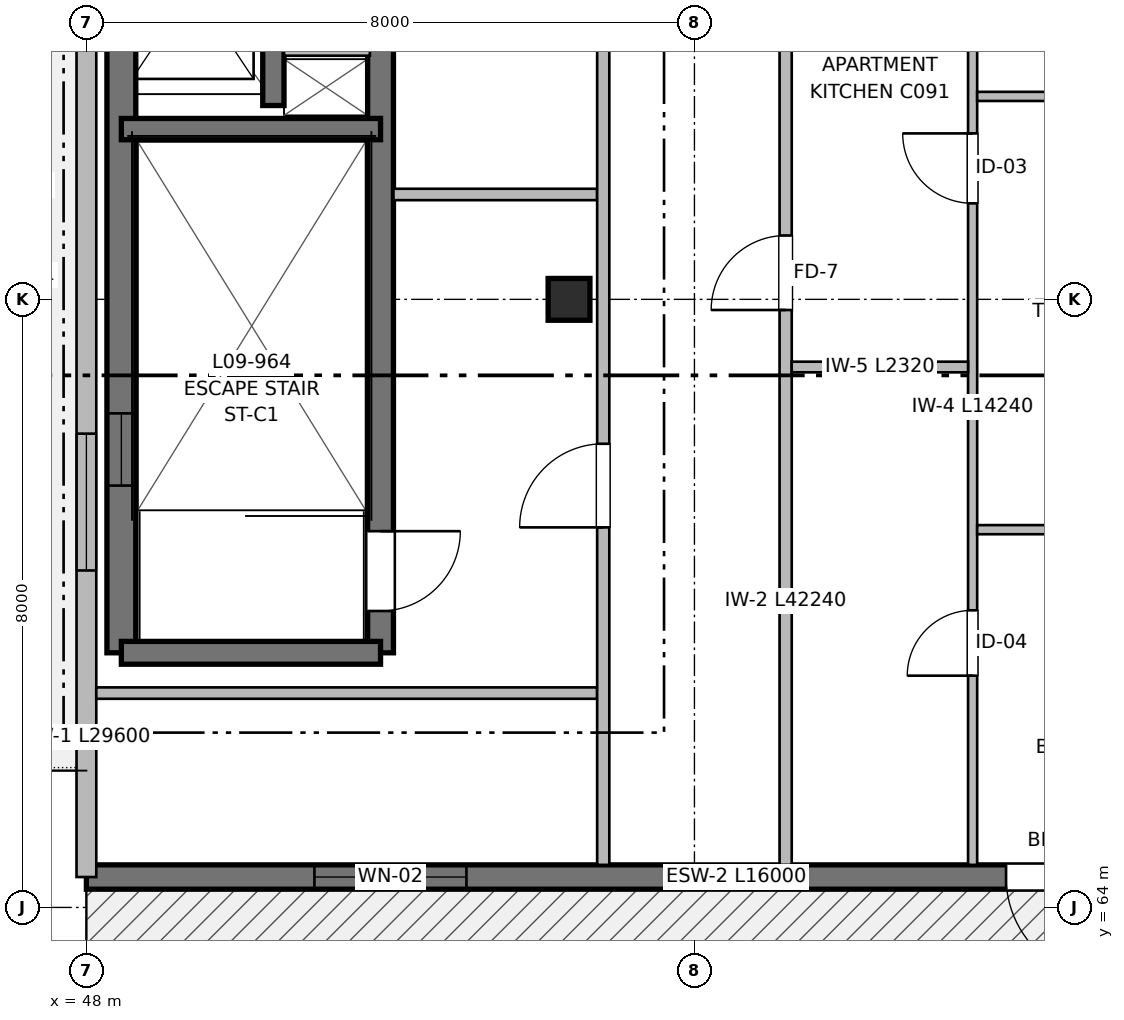
"""IFC4 building model, lengths in metres.
Left out: names, types, materials, properties, quantities, classifications, styles, units other than length and angle.
Written with IfcOpenShell. Run it as: python <this file> out.ifc"""

import sys

from ifc_helpers import new_model, si_unit, direction, frame, frame_2d, origin, origin_2d, place, context, subcontext, project, spatial, rectangle, extrude, element, fill, save


model = new_model("IFC4")
c1 = context("Model", 3, precision=1e-05, world=origin(), true_north=direction((0.0, 1.0)))
c2 = subcontext(c1, "Body", "Model", "MODEL_VIEW")
j1 = project(units=[si_unit("LENGTHUNIT", "METRE"), si_unit("PLANEANGLEUNIT", "RADIAN")], contexts=[c1])
p1 = place(None, origin())
s1 = spatial("IfcSite", under=j1, at=p1, CompositionType="ELEMENT")
p2 = place(p1, origin())
s2 = spatial("IfcBuilding", under=s1, at=p2, CompositionType="ELEMENT")
p3 = place(p2, frame((0.0, 0.0, 29.76)))
s3 = spatial("IfcBuildingStorey", under=s2, at=p3, CompositionType="ELEMENT", Elevation=29.76)
p4 = place(p3, frame((54.35, 72.0, 0.0), z_axis=(0.0, 0.0, 1.0), x_axis=(1.0, 0.0, 0.0)))
e1 = element("IfcColumn", 1, at=p4, inside=s3, PredefinedType="COLUMN", context=c2, shape_type="SweptSolid", body=[
    extrude(rectangle(XDim=0.55, YDim=0.55, at=origin_2d()), origin(), (0.0, 0.0, 1.0), 3.2),
])
p5 = place(p3, frame((48.46, 67.35, 0.0), z_axis=(0.0, 0.0, 1.0), x_axis=(0.0, 1.0, 0.0)))
e2 = element("IfcWall", 2, at=p5, inside=s3, PredefinedType="SHEAR", context=c2, shape_type="SweptSolid", body=[
    extrude(rectangle(XDim=12.45, YDim=0.38, at=frame_2d((6.225, 0.0))), origin(), (0.0, 0.0, 1.0), 3.2),
])
p6 = place(p5, frame((2.2, 0.0, 0.97)))
e3 = element("IfcOpeningElement", 3, at=p6, cuts=e2, PredefinedType="OPENING", context=c2, shape_type="SweptSolid", body=[
    extrude(rectangle(XDim=0.95, YDim=1.25, at=frame_2d((0.475, 0.625))), frame((0.0, 0.2, 0.0), z_axis=(0.0, -1.0, 0.0), x_axis=(1.0, 0.0, 0.0)), (0.0, 0.0, 1.0), 0.4),
])
p7 = place(p3, frame((51.87, 79.8, 0.0), z_axis=(0.0, 0.0, 1.0), x_axis=(0.0, -1.0, 0.0)))
e4 = element("IfcWall", 4, at=p7, inside=s3, PredefinedType="SHEAR", context=c2, shape_type="SweptSolid", body=[
    extrude(rectangle(XDim=12.45, YDim=0.34, at=frame_2d((6.225, 0.0))), origin(), (0.0, 0.0, 1.0), 3.2),
])
p8 = place(p7, frame((10.85, 0.0, 0.0)))
e5 = element("IfcOpeningElement", 5, at=p8, cuts=e4, PredefinedType="OPENING", context=c2, shape_type="SweptSolid", body=[
    extrude(rectangle(XDim=1.05, YDim=2.15, at=frame_2d((0.525, 1.075))), frame((0.0, 0.18, 0.0), z_axis=(0.0, -1.0, 0.0), x_axis=(1.0, 0.0, 0.0)), (0.0, 0.0, 1.0), 0.36),
])
p9 = place(p3, frame((51.87, 67.35, 0.0), z_axis=(0.0, 0.0, 1.0), x_axis=(-1.0, 0.0, 0.0)))
e6 = element("IfcWall", 6, at=p9, inside=s3, PredefinedType="SHEAR", context=c2, shape_type="SweptSolid", body=[
    extrude(rectangle(XDim=3.41, YDim=0.3, at=frame_2d((1.705, 0.0))), origin(), (0.0, 0.0, 1.0), 3.2),
])
p10 = place(p3, frame((48.46, 74.24, 0.0), z_axis=(0.0, 0.0, 1.0), x_axis=(1.0, 0.0, 0.0)))
e7 = element("IfcWall", 7, at=p10, inside=s3, PredefinedType="SHEAR", context=c2, shape_type="SweptSolid", body=[
    extrude(rectangle(XDim=3.41, YDim=0.28, at=frame_2d((1.705, 0.0))), origin(), (0.0, 0.0, 1.0), 3.2),
])
p11 = place(p3, frame((50.46, 74.55, 0.0), z_axis=(0.0, 0.0, 1.0), x_axis=(0.0, 1.0, 0.0)))
e8 = element("IfcWall", 8, at=p11, inside=s3, PredefinedType="SHEAR", context=c2, shape_type="SweptSolid", body=[
    extrude(rectangle(XDim=5.25, YDim=0.28, at=frame_2d((2.625, 0.0))), origin(), (0.0, 0.0, 1.0), 3.2),
])
p12 = place(p11, frame((1.15, 0.0, 0.0)))
e9 = element("IfcOpeningElement", 9, at=p12, cuts=e8, PredefinedType="OPENING", context=c2, shape_type="SweptSolid", body=[
    extrude(rectangle(XDim=1.0, YDim=2.15, at=frame_2d((0.5, 1.075))), frame((0.0, 0.15, 0.0), z_axis=(0.0, -1.0, 0.0), x_axis=(1.0, 0.0, 0.0)), (0.0, 0.0, 1.0), 0.3),
])
p13 = place(p11, frame((3.85, 0.0, 0.0)))
e10 = element("IfcOpeningElement", 10, at=p13, cuts=e8, PredefinedType="OPENING", context=c2, shape_type="SweptSolid", body=[
    extrude(rectangle(XDim=0.9, YDim=2.15, at=frame_2d((0.45, 1.075))), frame((0.0, 0.15, 0.0), z_axis=(0.0, -1.0, 0.0), x_axis=(1.0, 0.0, 0.0)), (0.0, 0.0, 1.0), 0.3),
])
p14 = place(p3, frame((50.6, 75.28, 0.0), z_axis=(0.0, 0.0, 1.0), x_axis=(1.0, 0.0, 0.0)))
e11 = element("IfcWall", 11, at=p14, inside=s3, PredefinedType="PARTITIONING", context=c2, shape_type="SweptSolid", body=[
    extrude(rectangle(XDim=1.13, YDim=0.15, at=frame_2d((0.565, 0.0))), origin(), (0.0, 0.0, 1.0), 2.95),
])
p15 = place(p3, frame((64.0, 64.4, 0.0), z_axis=(0.0, 0.0, 1.0), x_axis=(-1.0, 0.0, 0.0)))
e12 = element("IfcWall", 12, at=p15, inside=s3, PredefinedType="SHEAR", context=c2, shape_type="SweptSolid", body=[
    extrude(rectangle(XDim=16.0, YDim=0.32, at=frame_2d((8.0, 0.0))), origin(), (0.0, 0.0, 1.0), 2.98),
])
p16 = place(p15, frame((2.55, 0.0, 0.0)))
e13 = element("IfcOpeningElement", 13, at=p16, cuts=e12, PredefinedType="OPENING", context=c2, shape_type="SweptSolid", body=[
    extrude(rectangle(XDim=1.35, YDim=2.2, at=frame_2d((0.675, 1.1))), frame((0.0, 0.17, 0.0), z_axis=(0.0, -1.0, 0.0), x_axis=(1.0, 0.0, 0.0)), (0.0, 0.0, 1.0), 0.34),
])
p17 = place(p15, frame((11.0, 0.0, 0.72)))
e14 = element("IfcOpeningElement", 14, at=p17, cuts=e12, PredefinedType="OPENING", context=c2, shape_type="SweptSolid", body=[
    extrude(rectangle(XDim=2.0, YDim=1.5, at=frame_2d((1.0, 0.75))), frame((0.0, 0.17, 0.0), z_axis=(0.0, -1.0, 0.0), x_axis=(1.0, 0.0, 0.0)), (0.0, 0.0, 1.0), 0.34),
])
p18 = place(p3, frame((48.0, 64.4, 0.0), z_axis=(0.0, 0.0, 1.0), x_axis=(0.0, 1.0, 0.0)))
e15 = element("IfcWall", 15, at=p18, inside=s3, PredefinedType="SOLIDWALL", context=c2, shape_type="SweptSolid", body=[
    extrude(rectangle(XDim=29.6, YDim=0.26, at=frame_2d((14.8, 0.0))), origin(), (0.0, 0.0, 1.0), 2.98),
])
p19 = place(p18, frame((4.033, 0.0, 0.72)))
e16 = element("IfcOpeningElement", 16, at=p19, cuts=e15, PredefinedType="OPENING", context=c2, shape_type="SweptSolid", body=[
    extrude(rectangle(XDim=1.8, YDim=1.5, at=frame_2d((0.9, 0.75))), frame((0.0, 0.14, 0.0), z_axis=(0.0, -1.0, 0.0), x_axis=(1.0, 0.0, 0.0)), (0.0, 0.0, 1.0), 0.28),
])
p20 = place(p18, frame((15.6, 0.0, 0.72)))
e17 = element("IfcOpeningElement", 17, at=p20, cuts=e15, PredefinedType="OPENING", context=c2, shape_type="SweptSolid", body=[
    extrude(rectangle(XDim=2.0, YDim=1.5, at=frame_2d((1.0, 0.75))), frame((0.0, 0.14, 0.0), z_axis=(0.0, -1.0, 0.0), x_axis=(1.0, 0.0, 0.0)), (0.0, 0.0, 1.0), 0.28),
])
p21 = place(p18, frame((21.42, 0.0, 0.0)))
e18 = element("IfcOpeningElement", 18, at=p21, cuts=e15, PredefinedType="OPENING", context=c2, shape_type="SweptSolid", body=[
    extrude(rectangle(XDim=1.2, YDim=2.2, at=frame_2d((0.6, 1.1))), frame((0.0, 0.14, 0.0), z_axis=(0.0, -1.0, 0.0), x_axis=(1.0, 0.0, 0.0)), (0.0, 0.0, 1.0), 0.28),
])
p22 = place(p18, frame((25.967, 0.0, 0.9)))
e19 = element("IfcOpeningElement", 19, at=p22, cuts=e15, PredefinedType="OPENING", context=c2, shape_type="SweptSolid", body=[
    extrude(rectangle(XDim=1.2, YDim=1.05, at=frame_2d((0.6, 0.525))), frame((0.0, 0.14, 0.0), z_axis=(0.0, -1.0, 0.0), x_axis=(1.0, 0.0, 0.0)), (0.0, 0.0, 1.0), 0.28),
])
p23 = place(p3, frame((48.13, 66.82, 0.0), z_axis=(0.0, 0.0, 1.0), x_axis=(1.0, 0.0, 0.0)))
e20 = element("IfcWall", 20, at=p23, inside=s3, PredefinedType="PARTITIONING", context=c2, shape_type="SweptSolid", body=[
    extrude(rectangle(XDim=6.59, YDim=0.15, at=frame_2d((3.295, 0.0))), origin(), (0.0, 0.0, 1.0), 2.935),
])
p24 = place(p3, frame((52.04, 73.38, 0.0), z_axis=(0.0, 0.0, 1.0), x_axis=(1.0, 0.0, 0.0)))
e21 = element("IfcWall", 21, at=p24, inside=s3, PredefinedType="PARTITIONING", context=c2, shape_type="SweptSolid", body=[
    extrude(rectangle(XDim=2.68, YDim=0.15, at=frame_2d((1.34, 0.0))), origin(), (0.0, 0.0, 1.0), 2.935),
])
p25 = place(p3, frame((54.8, 64.56, 0.0), z_axis=(0.0, 0.0, 1.0), x_axis=(0.0, 1.0, 0.0)))
e22 = element("IfcWall", 22, at=p25, inside=s3, PredefinedType="PARTITIONING", context=c2, shape_type="SweptSolid", body=[
    extrude(rectangle(XDim=42.24, YDim=0.16, at=frame_2d((21.12, 0.0))), origin(), (0.0, 0.0, 1.0), 2.935),
])
p26 = place(p25, frame((4.44, 0.0, 0.0)))
e23 = element("IfcOpeningElement", 23, at=p26, cuts=e22, PredefinedType="OPENING", context=c2, shape_type="SweptSolid", body=[
    extrude(rectangle(XDim=1.1, YDim=2.15, at=frame_2d((0.55, 1.075))), frame((0.0, 0.09, 0.0), z_axis=(0.0, -1.0, 0.0), x_axis=(1.0, 0.0, 0.0)), (0.0, 0.0, 1.0), 0.18),
])
p27 = place(p25, frame((10.84, 0.0, 0.0)))
e24 = element("IfcOpeningElement", 24, at=p27, cuts=e22, PredefinedType="OPENING", context=c2, shape_type="SweptSolid", body=[
    extrude(rectangle(XDim=1.6, YDim=2.15, at=frame_2d((0.8, 1.075))), frame((0.0, 0.09, 0.0), z_axis=(0.0, -1.0, 0.0), x_axis=(1.0, 0.0, 0.0)), (0.0, 0.0, 1.0), 0.18),
])
p28 = place(p25, frame((24.445, 0.0, 0.0)))
e25 = element("IfcOpeningElement", 25, at=p28, cuts=e22, PredefinedType="OPENING", context=c2, shape_type="SweptSolid", body=[
    extrude(rectangle(XDim=0.98, YDim=2.15, at=frame_2d((0.49, 1.075))), frame((0.0, 0.09, 0.0), z_axis=(0.0, -1.0, 0.0), x_axis=(1.0, 0.0, 0.0)), (0.0, 0.0, 1.0), 0.18),
])
p29 = place(p25, frame((32.255, 0.0, 0.0)))
e26 = element("IfcOpeningElement", 26, at=p29, cuts=e22, PredefinedType="OPENING", context=c2, shape_type="SweptSolid", body=[
    extrude(rectangle(XDim=0.98, YDim=2.15, at=frame_2d((0.49, 1.075))), frame((0.0, 0.09, 0.0), z_axis=(0.0, -1.0, 0.0), x_axis=(1.0, 0.0, 0.0)), (0.0, 0.0, 1.0), 0.18),
])
p30 = place(p3, frame((57.2, 64.56, 0.0), z_axis=(0.0, 0.0, 1.0), x_axis=(0.0, 1.0, 0.0)))
e27 = element("IfcWall", 27, at=p30, inside=s3, PredefinedType="PARTITIONING", context=c2, shape_type="SweptSolid", body=[
    extrude(rectangle(XDim=42.24, YDim=0.16, at=frame_2d((21.12, 0.0))), origin(), (0.0, 0.0, 1.0), 2.935),
])
p31 = place(p30, frame((7.3, 0.0, 0.0)))
e28 = element("IfcOpeningElement", 28, at=p31, cuts=e27, PredefinedType="OPENING", context=c2, shape_type="SweptSolid", body=[
    extrude(rectangle(XDim=0.98, YDim=2.15, at=frame_2d((0.49, 1.075))), frame((0.0, 0.09, 0.0), z_axis=(0.0, -1.0, 0.0), x_axis=(1.0, 0.0, 0.0)), (0.0, 0.0, 1.0), 0.18),
])
p32 = place(p30, frame((21.68, 0.0, 0.0)))
e29 = element("IfcOpeningElement", 29, at=p32, cuts=e27, PredefinedType="OPENING", context=c2, shape_type="SweptSolid", body=[
    extrude(rectangle(XDim=1.02, YDim=2.15, at=frame_2d((0.51, 1.075))), frame((0.0, 0.09, 0.0), z_axis=(0.0, -1.0, 0.0), x_axis=(1.0, 0.0, 0.0)), (0.0, 0.0, 1.0), 0.18),
])
p33 = place(p30, frame((35.67, 0.0, 0.0)))
e30 = element("IfcOpeningElement", 30, at=p33, cuts=e27, PredefinedType="OPENING", context=c2, shape_type="SweptSolid", body=[
    extrude(rectangle(XDim=0.98, YDim=2.15, at=frame_2d((0.49, 1.075))), frame((0.0, 0.09, 0.0), z_axis=(0.0, -1.0, 0.0), x_axis=(1.0, 0.0, 0.0)), (0.0, 0.0, 1.0), 0.18),
])
p34 = place(p3, frame((59.66, 64.56, 0.0), z_axis=(0.0, 0.0, 1.0), x_axis=(0.0, 1.0, 0.0)))
e31 = element("IfcWall", 31, at=p34, inside=s3, PredefinedType="PARTITIONING", context=c2, shape_type="SweptSolid", body=[
    extrude(rectangle(XDim=14.24, YDim=0.12, at=frame_2d((7.12, 0.0))), origin(), (0.0, 0.0, 1.0), 2.935),
])
p35 = place(p34, frame((2.489, 0.0, 0.0)))
e32 = element("IfcOpeningElement", 32, at=p35, cuts=e31, PredefinedType="OPENING", context=c2, shape_type="SweptSolid", body=[
    extrude(rectangle(XDim=0.86, YDim=2.1, at=frame_2d((0.43, 1.05))), frame((0.0, 0.07, 0.0), z_axis=(0.0, -1.0, 0.0), x_axis=(1.0, 0.0, 0.0)), (0.0, 0.0, 1.0), 0.14),
])
p36 = place(p34, frame((8.703, 0.0, 0.0)))
e33 = element("IfcOpeningElement", 33, at=p36, cuts=e31, PredefinedType="OPENING", context=c2, shape_type="SweptSolid", body=[
    extrude(rectangle(XDim=0.92, YDim=2.1, at=frame_2d((0.46, 1.05))), frame((0.0, 0.07, 0.0), z_axis=(0.0, -1.0, 0.0), x_axis=(1.0, 0.0, 0.0)), (0.0, 0.0, 1.0), 0.14),
])
p37 = place(p3, frame((57.28, 71.11, 0.0), z_axis=(0.0, 0.0, 1.0), x_axis=(1.0, 0.0, 0.0)))
e34 = element("IfcWall", 34, at=p37, inside=s3, PredefinedType="PARTITIONING", context=c2, shape_type="SweptSolid", body=[
    extrude(rectangle(XDim=2.32, YDim=0.14, at=frame_2d((1.16, 0.0))), origin(), (0.0, 0.0, 1.0), 2.935),
])
p38 = place(p3, frame((59.72, 68.97, 0.0), z_axis=(0.0, 0.0, 1.0), x_axis=(1.0, 0.0, 0.0)))
e35 = element("IfcWall", 35, at=p38, inside=s3, PredefinedType="PARTITIONING", context=c2, shape_type="SweptSolid", body=[
    extrude(rectangle(XDim=4.15, YDim=0.12, at=frame_2d((2.075, 0.0))), origin(), (0.0, 0.0, 1.0), 2.935),
])
p39 = place(p38, frame((1.625, 0.0, 0.0)))
e36 = element("IfcOpeningElement", 36, at=p39, cuts=e35, PredefinedType="OPENING", context=c2, shape_type="SweptSolid", body=[
    extrude(rectangle(XDim=0.9, YDim=2.1, at=frame_2d((0.45, 1.05))), frame((0.0, 0.07, 0.0), z_axis=(0.0, -1.0, 0.0), x_axis=(1.0, 0.0, 0.0)), (0.0, 0.0, 1.0), 0.14),
])
p40 = place(p3, frame((59.72, 74.67, 0.0), z_axis=(0.0, 0.0, 1.0), x_axis=(1.0, 0.0, 0.0)))
e37 = element("IfcWall", 37, at=p40, inside=s3, PredefinedType="PARTITIONING", context=c2, shape_type="SweptSolid", body=[
    extrude(rectangle(XDim=4.15, YDim=0.12, at=frame_2d((2.075, 0.0))), origin(), (0.0, 0.0, 1.0), 2.935),
])
p41 = place(p40, frame((1.635, 0.0, 0.0)))
e38 = element("IfcOpeningElement", 38, at=p41, cuts=e37, PredefinedType="OPENING", context=c2, shape_type="SweptSolid", body=[
    extrude(rectangle(XDim=0.88, YDim=2.1, at=frame_2d((0.44, 1.05))), frame((0.0, 0.07, 0.0), z_axis=(0.0, -1.0, 0.0), x_axis=(1.0, 0.0, 0.0)), (0.0, 0.0, 1.0), 0.14),
])
p42 = place(p8, origin())
e39 = element("IfcDoor", 39, at=p42, inside=s3, OperationType="SINGLE_SWING_LEFT", PredefinedType="DOOR", context=c2, shape_type="SweptSolid", body=[
    extrude(rectangle(XDim=1.05, YDim=2.15, at=frame_2d((0.525, 1.075))), frame((0.0, 0.025, 0.0), z_axis=(0.0, -1.0, 0.0), x_axis=(1.0, 0.0, 0.0)), (0.0, 0.0, 1.0), 0.05),
])
fill(e5, e39)
p43 = place(p6, origin())
e40 = element("IfcWindow", 40, at=p43, inside=s3, PartitioningType="SINGLE_PANEL", PredefinedType="WINDOW", context=c2, shape_type="SweptSolid", body=[
    extrude(rectangle(XDim=0.95, YDim=1.25, at=frame_2d((0.475, 0.625))), frame((0.0, 0.03, 0.0), z_axis=(0.0, -1.0, 0.0), x_axis=(1.0, 0.0, 0.0)), (0.0, 0.0, 1.0), 0.06),
])
fill(e3, e40)
p44 = place(p16, origin())
e41 = element("IfcDoor", 41, at=p44, inside=s3, OperationType="SINGLE_SWING_LEFT", PredefinedType="DOOR", context=c2, shape_type="SweptSolid", body=[
    extrude(rectangle(XDim=1.35, YDim=2.2, at=frame_2d((0.675, 1.1))), frame((0.0, 0.025, 0.0), z_axis=(0.0, -1.0, 0.0), x_axis=(1.0, 0.0, 0.0)), (0.0, 0.0, 1.0), 0.05),
])
fill(e13, e41)
p45 = place(p17, origin())
e42 = element("IfcWindow", 42, at=p45, inside=s3, PartitioningType="SINGLE_PANEL", PredefinedType="WINDOW", context=c2, shape_type="SweptSolid", body=[
    extrude(rectangle(XDim=2.0, YDim=1.5, at=frame_2d((1.0, 0.75))), frame((0.0, 0.03, 0.0), z_axis=(0.0, -1.0, 0.0), x_axis=(1.0, 0.0, 0.0)), (0.0, 0.0, 1.0), 0.06),
])
fill(e14, e42)
p46 = place(p19, origin())
e43 = element("IfcWindow", 43, at=p46, inside=s3, PartitioningType="SINGLE_PANEL", PredefinedType="WINDOW", context=c2, shape_type="SweptSolid", body=[
    extrude(rectangle(XDim=1.8, YDim=1.5, at=frame_2d((0.9, 0.75))), frame((0.0, 0.03, 0.0), z_axis=(0.0, -1.0, 0.0), x_axis=(1.0, 0.0, 0.0)), (0.0, 0.0, 1.0), 0.06),
])
fill(e16, e43)
p47 = place(p26, origin())
e44 = element("IfcDoor", 44, at=p47, inside=s3, OperationType="SINGLE_SWING_LEFT", PredefinedType="DOOR", context=c2, shape_type="SweptSolid", body=[
    extrude(rectangle(XDim=1.1, YDim=2.15, at=frame_2d((0.55, 1.075))), frame((0.0, 0.025, 0.0), z_axis=(0.0, -1.0, 0.0), x_axis=(1.0, 0.0, 0.0)), (0.0, 0.0, 1.0), 0.05),
])
fill(e23, e44)
p48 = place(p35, origin())
e45 = element("IfcDoor", 45, at=p48, inside=s3, OperationType="SINGLE_SWING_LEFT", PredefinedType="DOOR", context=c2, shape_type="SweptSolid", body=[
    extrude(rectangle(XDim=0.86, YDim=2.1, at=frame_2d((0.43, 1.05))), frame((0.0, 0.025, 0.0), z_axis=(0.0, -1.0, 0.0), x_axis=(1.0, 0.0, 0.0)), (0.0, 0.0, 1.0), 0.05),
])
fill(e32, e45)
p49 = place(p36, origin())
e46 = element("IfcDoor", 46, at=p49, inside=s3, OperationType="SINGLE_SWING_RIGHT", PredefinedType="DOOR", context=c2, shape_type="SweptSolid", body=[
    extrude(rectangle(XDim=0.92, YDim=2.1, at=frame_2d((0.46, 1.05))), frame((0.0, 0.025, 0.0), z_axis=(0.0, -1.0, 0.0), x_axis=(1.0, 0.0, 0.0)), (0.0, 0.0, 1.0), 0.05),
])
fill(e33, e46)
p50 = place(p31, origin())
e47 = element("IfcDoor", 47, at=p50, inside=s3, OperationType="SINGLE_SWING_LEFT", PredefinedType="DOOR", context=c2, shape_type="SweptSolid", body=[
    extrude(rectangle(XDim=0.98, YDim=2.15, at=frame_2d((0.49, 1.075))), frame((0.0, 0.025, 0.0), z_axis=(0.0, -1.0, 0.0), x_axis=(1.0, 0.0, 0.0)), (0.0, 0.0, 1.0), 0.05),
])
fill(e28, e47)
save(model, sys.argv[1])
